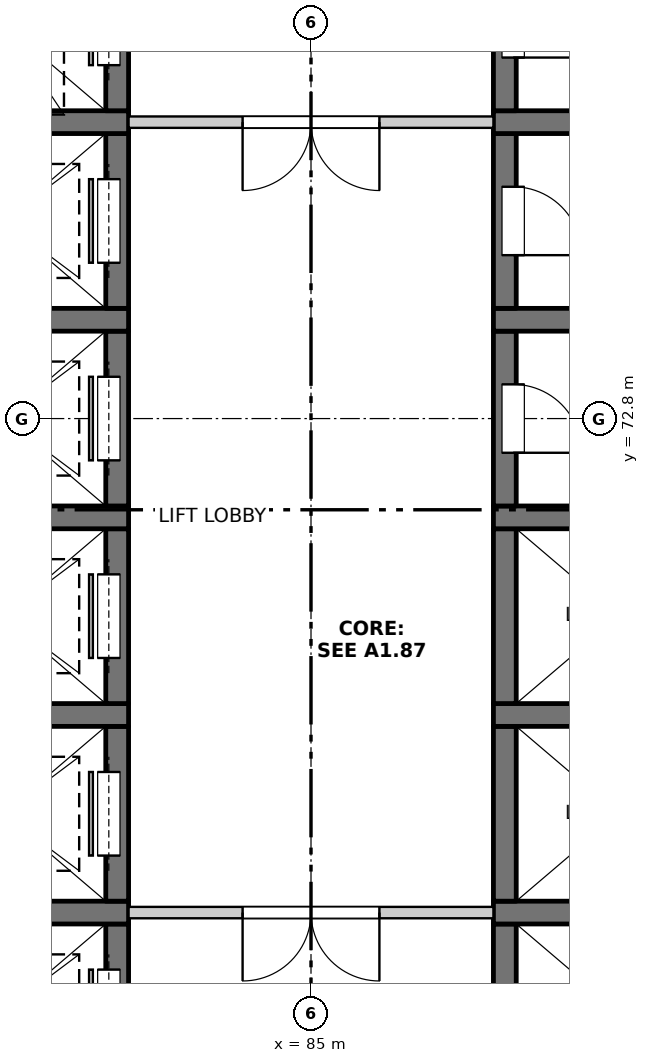
"""IFC4 building model, lengths in metres.
Left out: names, types, materials, properties, quantities, classifications, styles, units other than length and angle.
Written with IfcOpenShell. Run it as: python <this file> out.ifc"""

import sys

from ifc_helpers import new_model, si_unit, direction, frame, frame_2d, origin, place, context, subcontext, project, spatial, rectangle, extrude, element, fill, save


model = new_model("IFC4")
c1 = context("Model", 3, precision=1e-05, world=origin(), true_north=direction((0.0, 1.0)))
c2 = subcontext(c1, "Body", "Model", "MODEL_VIEW")
j1 = project(units=[si_unit("LENGTHUNIT", "METRE"), si_unit("PLANEANGLEUNIT", "RADIAN")], contexts=[c1])
p1 = place(None, origin())
s1 = spatial("IfcSite", under=j1, at=p1, CompositionType="ELEMENT")
p2 = place(p1, origin())
s2 = spatial("IfcBuilding", under=s1, at=p2, CompositionType="ELEMENT")
p3 = place(p2, frame((0.0, 0.0, 127.1)))
s3 = spatial("IfcBuildingStorey", under=s2, at=p3, CompositionType="ELEMENT", Elevation=127.1)
p4 = place(p3, frame((82.45, 63.85, -0.25), z_axis=(0.0, 0.0, 1.0), x_axis=(0.0, 1.0, 0.0)))
e1 = element("IfcWall", 1, at=p4, inside=s3, PredefinedType="SOLIDWALL", context=c2, shape_type="SweptSolid", body=[
    extrude(rectangle(XDim=2.3, YDim=0.3, at=frame_2d((1.15, 0.0))), origin(), (0.0, 0.0, 1.0), 3.4),
])
p5 = place(p4, frame((0.6, 0.0, 0.25)))
e2 = element("IfcOpeningElement", 2, at=p5, cuts=e1, PredefinedType="OPENING", context=c2, shape_type="SweptSolid", body=[
    extrude(rectangle(XDim=1.1, YDim=2.1, at=frame_2d((0.55, 1.05))), frame((0.0, 0.16, 0.0), z_axis=(0.0, -1.0, 0.0), x_axis=(1.0, 0.0, 0.0)), (0.0, 0.0, 1.0), 0.32),
])
p6 = place(p3, frame((79.6, 66.3, -0.25), z_axis=(0.0, 0.0, 1.0), x_axis=(1.0, 0.0, 0.0)))
e3 = element("IfcWall", 3, at=p6, inside=s3, PredefinedType="SOLIDWALL", context=c2, shape_type="SweptSolid", body=[
    extrude(rectangle(XDim=3.0, YDim=0.3, at=frame_2d((1.5, 0.0))), origin(), (0.0, 0.0, 1.0), 3.4),
])
p7 = place(p3, frame((82.45, 66.45, -0.25), z_axis=(0.0, 0.0, 1.0), x_axis=(0.0, 1.0, 0.0)))
e4 = element("IfcWall", 4, at=p7, inside=s3, PredefinedType="SOLIDWALL", context=c2, shape_type="SweptSolid", body=[
    extrude(rectangle(XDim=2.3, YDim=0.3, at=frame_2d((1.15, 0.0))), origin(), (0.0, 0.0, 1.0), 3.4),
])
p8 = place(p7, frame((0.6, 0.0, 0.25)))
e5 = element("IfcOpeningElement", 5, at=p8, cuts=e4, PredefinedType="OPENING", context=c2, shape_type="SweptSolid", body=[
    extrude(rectangle(XDim=1.1, YDim=2.1, at=frame_2d((0.55, 1.05))), frame((0.0, 0.16, 0.0), z_axis=(0.0, -1.0, 0.0), x_axis=(1.0, 0.0, 0.0)), (0.0, 0.0, 1.0), 0.32),
])
p9 = place(p3, frame((79.6, 68.9, -0.25), z_axis=(0.0, 0.0, 1.0), x_axis=(1.0, 0.0, 0.0)))
e6 = element("IfcWall", 6, at=p9, inside=s3, PredefinedType="SOLIDWALL", context=c2, shape_type="SweptSolid", body=[
    extrude(rectangle(XDim=3.0, YDim=0.3, at=frame_2d((1.5, 0.0))), origin(), (0.0, 0.0, 1.0), 3.4),
])
p10 = place(p3, frame((82.45, 69.05, -0.25), z_axis=(0.0, 0.0, 1.0), x_axis=(0.0, 1.0, 0.0)))
e7 = element("IfcWall", 7, at=p10, inside=s3, PredefinedType="SOLIDWALL", context=c2, shape_type="SweptSolid", body=[
    extrude(rectangle(XDim=2.3, YDim=0.3, at=frame_2d((1.15, 0.0))), origin(), (0.0, 0.0, 1.0), 3.4),
])
p11 = place(p10, frame((0.6, 0.0, 0.25)))
e8 = element("IfcOpeningElement", 8, at=p11, cuts=e7, PredefinedType="OPENING", context=c2, shape_type="SweptSolid", body=[
    extrude(rectangle(XDim=1.1, YDim=2.1, at=frame_2d((0.55, 1.05))), frame((0.0, 0.16, 0.0), z_axis=(0.0, -1.0, 0.0), x_axis=(1.0, 0.0, 0.0)), (0.0, 0.0, 1.0), 0.32),
])
p12 = place(p3, frame((79.6, 71.5, -0.25), z_axis=(0.0, 0.0, 1.0), x_axis=(1.0, 0.0, 0.0)))
e9 = element("IfcWall", 9, at=p12, inside=s3, PredefinedType="SOLIDWALL", context=c2, shape_type="SweptSolid", body=[
    extrude(rectangle(XDim=3.0, YDim=0.3, at=frame_2d((1.5, 0.0))), origin(), (0.0, 0.0, 1.0), 3.4),
])
p13 = place(p3, frame((82.45, 71.65, -0.25), z_axis=(0.0, 0.0, 1.0), x_axis=(0.0, 1.0, 0.0)))
e10 = element("IfcWall", 10, at=p13, inside=s3, PredefinedType="SOLIDWALL", context=c2, shape_type="SweptSolid", body=[
    extrude(rectangle(XDim=2.3, YDim=0.3, at=frame_2d((1.15, 0.0))), origin(), (0.0, 0.0, 1.0), 3.4),
])
p14 = place(p13, frame((0.6, 0.0, 0.25)))
e11 = element("IfcOpeningElement", 11, at=p14, cuts=e10, PredefinedType="OPENING", context=c2, shape_type="SweptSolid", body=[
    extrude(rectangle(XDim=1.1, YDim=2.1, at=frame_2d((0.55, 1.05))), frame((0.0, 0.16, 0.0), z_axis=(0.0, -1.0, 0.0), x_axis=(1.0, 0.0, 0.0)), (0.0, 0.0, 1.0), 0.32),
])
p15 = place(p3, frame((79.6, 74.1, -0.25), z_axis=(0.0, 0.0, 1.0), x_axis=(1.0, 0.0, 0.0)))
e12 = element("IfcWall", 12, at=p15, inside=s3, PredefinedType="SOLIDWALL", context=c2, shape_type="SweptSolid", body=[
    extrude(rectangle(XDim=3.0, YDim=0.3, at=frame_2d((1.5, 0.0))), origin(), (0.0, 0.0, 1.0), 3.4),
])
p16 = place(p3, frame((82.45, 74.25, -0.25), z_axis=(0.0, 0.0, 1.0), x_axis=(0.0, 1.0, 0.0)))
e13 = element("IfcWall", 13, at=p16, inside=s3, PredefinedType="SOLIDWALL", context=c2, shape_type="SweptSolid", body=[
    extrude(rectangle(XDim=2.3, YDim=0.3, at=frame_2d((1.15, 0.0))), origin(), (0.0, 0.0, 1.0), 3.4),
])
p17 = place(p16, frame((0.6, 0.0, 0.25)))
e14 = element("IfcOpeningElement", 14, at=p17, cuts=e13, PredefinedType="OPENING", context=c2, shape_type="SweptSolid", body=[
    extrude(rectangle(XDim=1.1, YDim=2.1, at=frame_2d((0.55, 1.05))), frame((0.0, 0.16, 0.0), z_axis=(0.0, -1.0, 0.0), x_axis=(1.0, 0.0, 0.0)), (0.0, 0.0, 1.0), 0.32),
])
p18 = place(p3, frame((79.6, 76.7, -0.25), z_axis=(0.0, 0.0, 1.0), x_axis=(1.0, 0.0, 0.0)))
e15 = element("IfcWall", 15, at=p18, inside=s3, PredefinedType="SOLIDWALL", context=c2, shape_type="SweptSolid", body=[
    extrude(rectangle(XDim=3.0, YDim=0.3, at=frame_2d((1.5, 0.0))), origin(), (0.0, 0.0, 1.0), 3.4),
])
p19 = place(p3, frame((82.45, 76.85, -0.25), z_axis=(0.0, 0.0, 1.0), x_axis=(0.0, 1.0, 0.0)))
e16 = element("IfcWall", 16, at=p19, inside=s3, PredefinedType="SOLIDWALL", context=c2, shape_type="SweptSolid", body=[
    extrude(rectangle(XDim=2.3, YDim=0.3, at=frame_2d((1.15, 0.0))), origin(), (0.0, 0.0, 1.0), 3.4),
])
p20 = place(p19, frame((0.6, 0.0, 0.25)))
e17 = element("IfcOpeningElement", 17, at=p20, cuts=e16, PredefinedType="OPENING", context=c2, shape_type="SweptSolid", body=[
    extrude(rectangle(XDim=1.1, YDim=2.1, at=frame_2d((0.55, 1.05))), frame((0.0, 0.16, 0.0), z_axis=(0.0, -1.0, 0.0), x_axis=(1.0, 0.0, 0.0)), (0.0, 0.0, 1.0), 0.32),
])
p21 = place(p3, frame((87.55, 63.85, -0.25), z_axis=(0.0, 0.0, 1.0), x_axis=(0.0, 1.0, 0.0)))
e18 = element("IfcWall", 18, at=p21, inside=s3, PredefinedType="SOLIDWALL", context=c2, shape_type="SweptSolid", body=[
    extrude(rectangle(XDim=2.3, YDim=0.3, at=frame_2d((1.15, 0.0))), origin(), (0.0, 0.0, 1.0), 3.4),
])
p22 = place(p3, frame((87.4, 66.3, -0.25), z_axis=(0.0, 0.0, 1.0), x_axis=(1.0, 0.0, 0.0)))
e19 = element("IfcWall", 19, at=p22, inside=s3, PredefinedType="SOLIDWALL", context=c2, shape_type="SweptSolid", body=[
    extrude(rectangle(XDim=3.0, YDim=0.3, at=frame_2d((1.5, 0.0))), origin(), (0.0, 0.0, 1.0), 3.4),
])
p23 = place(p3, frame((87.55, 66.45, -0.25), z_axis=(0.0, 0.0, 1.0), x_axis=(0.0, 1.0, 0.0)))
e20 = element("IfcWall", 20, at=p23, inside=s3, PredefinedType="SOLIDWALL", context=c2, shape_type="SweptSolid", body=[
    extrude(rectangle(XDim=2.3, YDim=0.3, at=frame_2d((1.15, 0.0))), origin(), (0.0, 0.0, 1.0), 3.4),
])
p24 = place(p3, frame((87.4, 68.9, -0.25), z_axis=(0.0, 0.0, 1.0), x_axis=(1.0, 0.0, 0.0)))
e21 = element("IfcWall", 21, at=p24, inside=s3, PredefinedType="SOLIDWALL", context=c2, shape_type="SweptSolid", body=[
    extrude(rectangle(XDim=3.0, YDim=0.3, at=frame_2d((1.5, 0.0))), origin(), (0.0, 0.0, 1.0), 3.4),
])
p25 = place(p3, frame((87.55, 69.05, -0.25), z_axis=(0.0, 0.0, 1.0), x_axis=(0.0, 1.0, 0.0)))
e22 = element("IfcWall", 22, at=p25, inside=s3, PredefinedType="SOLIDWALL", context=c2, shape_type="SweptSolid", body=[
    extrude(rectangle(XDim=2.3, YDim=0.3, at=frame_2d((1.15, 0.0))), origin(), (0.0, 0.0, 1.0), 3.4),
])
p26 = place(p3, frame((87.4, 71.5, -0.25), z_axis=(0.0, 0.0, 1.0), x_axis=(1.0, 0.0, 0.0)))
e23 = element("IfcWall", 23, at=p26, inside=s3, PredefinedType="SOLIDWALL", context=c2, shape_type="SweptSolid", body=[
    extrude(rectangle(XDim=3.0, YDim=0.3, at=frame_2d((1.5, 0.0))), origin(), (0.0, 0.0, 1.0), 3.4),
])
p27 = place(p3, frame((87.55, 71.65, -0.25), z_axis=(0.0, 0.0, 1.0), x_axis=(0.0, 1.0, 0.0)))
e24 = element("IfcWall", 24, at=p27, inside=s3, PredefinedType="SOLIDWALL", context=c2, shape_type="SweptSolid", body=[
    extrude(rectangle(XDim=2.3, YDim=0.3, at=frame_2d((1.15, 0.0))), origin(), (0.0, 0.0, 1.0), 3.4),
])
p28 = place(p27, frame((0.7, 0.0, 0.25)))
e25 = element("IfcOpeningElement", 25, at=p28, cuts=e24, PredefinedType="OPENING", context=c2, shape_type="SweptSolid", body=[
    extrude(rectangle(XDim=0.9, YDim=2.1, at=frame_2d((0.45, 1.05))), frame((0.0, 0.16, 0.0), z_axis=(0.0, -1.0, 0.0), x_axis=(1.0, 0.0, 0.0)), (0.0, 0.0, 1.0), 0.32),
])
p29 = place(p3, frame((87.4, 74.1, -0.25), z_axis=(0.0, 0.0, 1.0), x_axis=(1.0, 0.0, 0.0)))
e26 = element("IfcWall", 26, at=p29, inside=s3, PredefinedType="SOLIDWALL", context=c2, shape_type="SweptSolid", body=[
    extrude(rectangle(XDim=3.0, YDim=0.3, at=frame_2d((1.5, 0.0))), origin(), (0.0, 0.0, 1.0), 3.4),
])
p30 = place(p3, frame((87.55, 74.25, -0.25), z_axis=(0.0, 0.0, 1.0), x_axis=(0.0, 1.0, 0.0)))
e27 = element("IfcWall", 27, at=p30, inside=s3, PredefinedType="SOLIDWALL", context=c2, shape_type="SweptSolid", body=[
    extrude(rectangle(XDim=2.3, YDim=0.3, at=frame_2d((1.15, 0.0))), origin(), (0.0, 0.0, 1.0), 3.4),
])
p31 = place(p30, frame((0.7, 0.0, 0.25)))
e28 = element("IfcOpeningElement", 28, at=p31, cuts=e27, PredefinedType="OPENING", context=c2, shape_type="SweptSolid", body=[
    extrude(rectangle(XDim=0.9, YDim=2.1, at=frame_2d((0.45, 1.05))), frame((0.0, 0.16, 0.0), z_axis=(0.0, -1.0, 0.0), x_axis=(1.0, 0.0, 0.0)), (0.0, 0.0, 1.0), 0.32),
])
p32 = place(p3, frame((87.4, 76.7, -0.25), z_axis=(0.0, 0.0, 1.0), x_axis=(1.0, 0.0, 0.0)))
e29 = element("IfcWall", 29, at=p32, inside=s3, PredefinedType="SOLIDWALL", context=c2, shape_type="SweptSolid", body=[
    extrude(rectangle(XDim=3.0, YDim=0.3, at=frame_2d((1.5, 0.0))), origin(), (0.0, 0.0, 1.0), 3.4),
])
p33 = place(p3, frame((87.55, 76.85, -0.25), z_axis=(0.0, 0.0, 1.0), x_axis=(0.0, 1.0, 0.0)))
e30 = element("IfcWall", 30, at=p33, inside=s3, PredefinedType="SOLIDWALL", context=c2, shape_type="SweptSolid", body=[
    extrude(rectangle(XDim=2.3, YDim=0.3, at=frame_2d((1.15, 0.0))), origin(), (0.0, 0.0, 1.0), 3.4),
])
p34 = place(p33, frame((0.7, 0.0, 0.25)))
e31 = element("IfcOpeningElement", 31, at=p34, cuts=e30, PredefinedType="OPENING", context=c2, shape_type="SweptSolid", body=[
    extrude(rectangle(XDim=0.9, YDim=2.1, at=frame_2d((0.45, 1.05))), frame((0.0, 0.16, 0.0), z_axis=(0.0, -1.0, 0.0), x_axis=(1.0, 0.0, 0.0)), (0.0, 0.0, 1.0), 0.32),
])
p35 = place(p3, frame((82.6, 66.3, 0.0), z_axis=(0.0, 0.0, 1.0), x_axis=(1.0, 0.0, 0.0)))
e32 = element("IfcWall", 32, at=p35, inside=s3, PredefinedType="PARTITIONING", context=c2, shape_type="SweptSolid", body=[
    extrude(rectangle(XDim=4.8, YDim=0.15, at=frame_2d((2.4, 0.0))), origin(), (0.0, 0.0, 1.0), 3.15),
])
p36 = place(p35, frame((1.5, 0.0, 0.0)))
e33 = element("IfcOpeningElement", 33, at=p36, cuts=e32, PredefinedType="OPENING", context=c2, shape_type="SweptSolid", body=[
    extrude(rectangle(XDim=1.8, YDim=2.1, at=frame_2d((0.9, 1.05))), frame((0.0, 0.085, 0.0), z_axis=(0.0, -1.0, 0.0), x_axis=(1.0, 0.0, 0.0)), (0.0, 0.0, 1.0), 0.17),
])
p37 = place(p3, frame((82.6, 76.7, 0.0), z_axis=(0.0, 0.0, 1.0), x_axis=(1.0, 0.0, 0.0)))
e34 = element("IfcWall", 34, at=p37, inside=s3, PredefinedType="PARTITIONING", context=c2, shape_type="SweptSolid", body=[
    extrude(rectangle(XDim=4.8, YDim=0.15, at=frame_2d((2.4, 0.0))), origin(), (0.0, 0.0, 1.0), 3.15),
])
p38 = place(p37, frame((1.5, 0.0, 0.0)))
e35 = element("IfcOpeningElement", 35, at=p38, cuts=e34, PredefinedType="OPENING", context=c2, shape_type="SweptSolid", body=[
    extrude(rectangle(XDim=1.8, YDim=2.1, at=frame_2d((0.9, 1.05))), frame((0.0, 0.085, 0.0), z_axis=(0.0, -1.0, 0.0), x_axis=(1.0, 0.0, 0.0)), (0.0, 0.0, 1.0), 0.17),
])
p39 = place(p5, origin())
e36 = element("IfcDoor", 36, at=p39, inside=s3, OperationType="SLIDING_TO_RIGHT", PredefinedType="DOOR", context=c2, shape_type="SweptSolid", body=[
    extrude(rectangle(XDim=1.1, YDim=2.1, at=frame_2d((0.55, 1.05))), frame((0.0, 0.135, 0.0), z_axis=(0.0, -1.0, 0.0), x_axis=(1.0, 0.0, 0.0)), (0.0, 0.0, 1.0), 0.05),
])
fill(e2, e36)
p40 = place(p36, origin())
e37 = element("IfcDoor", 37, at=p40, inside=s3, OperationType="DOUBLE_DOOR_SINGLE_SWING", PredefinedType="DOOR", context=c2, shape_type="SweptSolid", body=[
    extrude(rectangle(XDim=1.8, YDim=2.1, at=frame_2d((0.9, 1.05))), frame((0.0, 0.025, 0.0), z_axis=(0.0, -1.0, 0.0), x_axis=(1.0, 0.0, 0.0)), (0.0, 0.0, 1.0), 0.05),
])
fill(e33, e37)
p41 = place(p8, origin())
e38 = element("IfcDoor", 38, at=p41, inside=s3, OperationType="SLIDING_TO_RIGHT", PredefinedType="DOOR", context=c2, shape_type="SweptSolid", body=[
    extrude(rectangle(XDim=1.1, YDim=2.1, at=frame_2d((0.55, 1.05))), frame((0.0, 0.135, 0.0), z_axis=(0.0, -1.0, 0.0), x_axis=(1.0, 0.0, 0.0)), (0.0, 0.0, 1.0), 0.05),
])
fill(e5, e38)
p42 = place(p11, origin())
e39 = element("IfcDoor", 39, at=p42, inside=s3, OperationType="SLIDING_TO_LEFT", PredefinedType="DOOR", context=c2, shape_type="SweptSolid", body=[
    extrude(rectangle(XDim=1.1, YDim=2.1, at=frame_2d((0.55, 1.05))), frame((0.0, 0.135, 0.0), z_axis=(0.0, -1.0, 0.0), x_axis=(1.0, 0.0, 0.0)), (0.0, 0.0, 1.0), 0.05),
])
fill(e8, e39)
p43 = place(p14, origin())
e40 = element("IfcDoor", 40, at=p43, inside=s3, OperationType="SLIDING_TO_LEFT", PredefinedType="DOOR", context=c2, shape_type="SweptSolid", body=[
    extrude(rectangle(XDim=1.1, YDim=2.1, at=frame_2d((0.55, 1.05))), frame((0.0, 0.135, 0.0), z_axis=(0.0, -1.0, 0.0), x_axis=(1.0, 0.0, 0.0)), (0.0, 0.0, 1.0), 0.05),
])
fill(e11, e40)
p44 = place(p28, origin())
e41 = element("IfcDoor", 41, at=p44, inside=s3, OperationType="SINGLE_SWING_RIGHT", PredefinedType="DOOR", context=c2, shape_type="SweptSolid", body=[
    extrude(rectangle(XDim=0.9, YDim=2.1, at=frame_2d((0.45, 1.05))), frame((0.0, -0.085, 0.0), z_axis=(0.0, -1.0, 0.0), x_axis=(1.0, 0.0, 0.0)), (0.0, 0.0, 1.0), 0.05),
])
fill(e25, e41)
p45 = place(p17, origin())
e42 = element("IfcDoor", 42, at=p45, inside=s3, OperationType="SLIDING_TO_LEFT", PredefinedType="DOOR", context=c2, shape_type="SweptSolid", body=[
    extrude(rectangle(XDim=1.1, YDim=2.1, at=frame_2d((0.55, 1.05))), frame((0.0, 0.135, 0.0), z_axis=(0.0, -1.0, 0.0), x_axis=(1.0, 0.0, 0.0)), (0.0, 0.0, 1.0), 0.05),
])
fill(e14, e42)
p46 = place(p31, origin())
e43 = element("IfcDoor", 43, at=p46, inside=s3, OperationType="SINGLE_SWING_RIGHT", PredefinedType="DOOR", context=c2, shape_type="SweptSolid", body=[
    extrude(rectangle(XDim=0.9, YDim=2.1, at=frame_2d((0.45, 1.05))), frame((0.0, -0.085, 0.0), z_axis=(0.0, -1.0, 0.0), x_axis=(1.0, 0.0, 0.0)), (0.0, 0.0, 1.0), 0.05),
])
fill(e28, e43)
p47 = place(p38, origin())
e44 = element("IfcDoor", 44, at=p47, inside=s3, OperationType="DOUBLE_DOOR_SINGLE_SWING", PredefinedType="DOOR", context=c2, shape_type="SweptSolid", body=[
    extrude(rectangle(XDim=1.8, YDim=2.1, at=frame_2d((0.9, 1.05))), frame((0.0, 0.025, 0.0), z_axis=(0.0, -1.0, 0.0), x_axis=(1.0, 0.0, 0.0)), (0.0, 0.0, 1.0), 0.05),
])
fill(e35, e44)
p48 = place(p20, origin())
e45 = element("IfcDoor", 45, at=p48, inside=s3, OperationType="SLIDING_TO_LEFT", PredefinedType="DOOR", context=c2, shape_type="SweptSolid", body=[
    extrude(rectangle(XDim=1.1, YDim=2.1, at=frame_2d((0.55, 1.05))), frame((0.0, 0.135, 0.0), z_axis=(0.0, -1.0, 0.0), x_axis=(1.0, 0.0, 0.0)), (0.0, 0.0, 1.0), 0.05),
])
fill(e17, e45)
p49 = place(p34, origin())
e46 = element("IfcDoor", 46, at=p49, inside=s3, OperationType="SINGLE_SWING_RIGHT", PredefinedType="DOOR", context=c2, shape_type="SweptSolid", body=[
    extrude(rectangle(XDim=0.9, YDim=2.1, at=frame_2d((0.45, 1.05))), frame((0.0, -0.085, 0.0), z_axis=(0.0, -1.0, 0.0), x_axis=(1.0, 0.0, 0.0)), (0.0, 0.0, 1.0), 0.05),
])
fill(e31, e46)
save(model, sys.argv[1])
